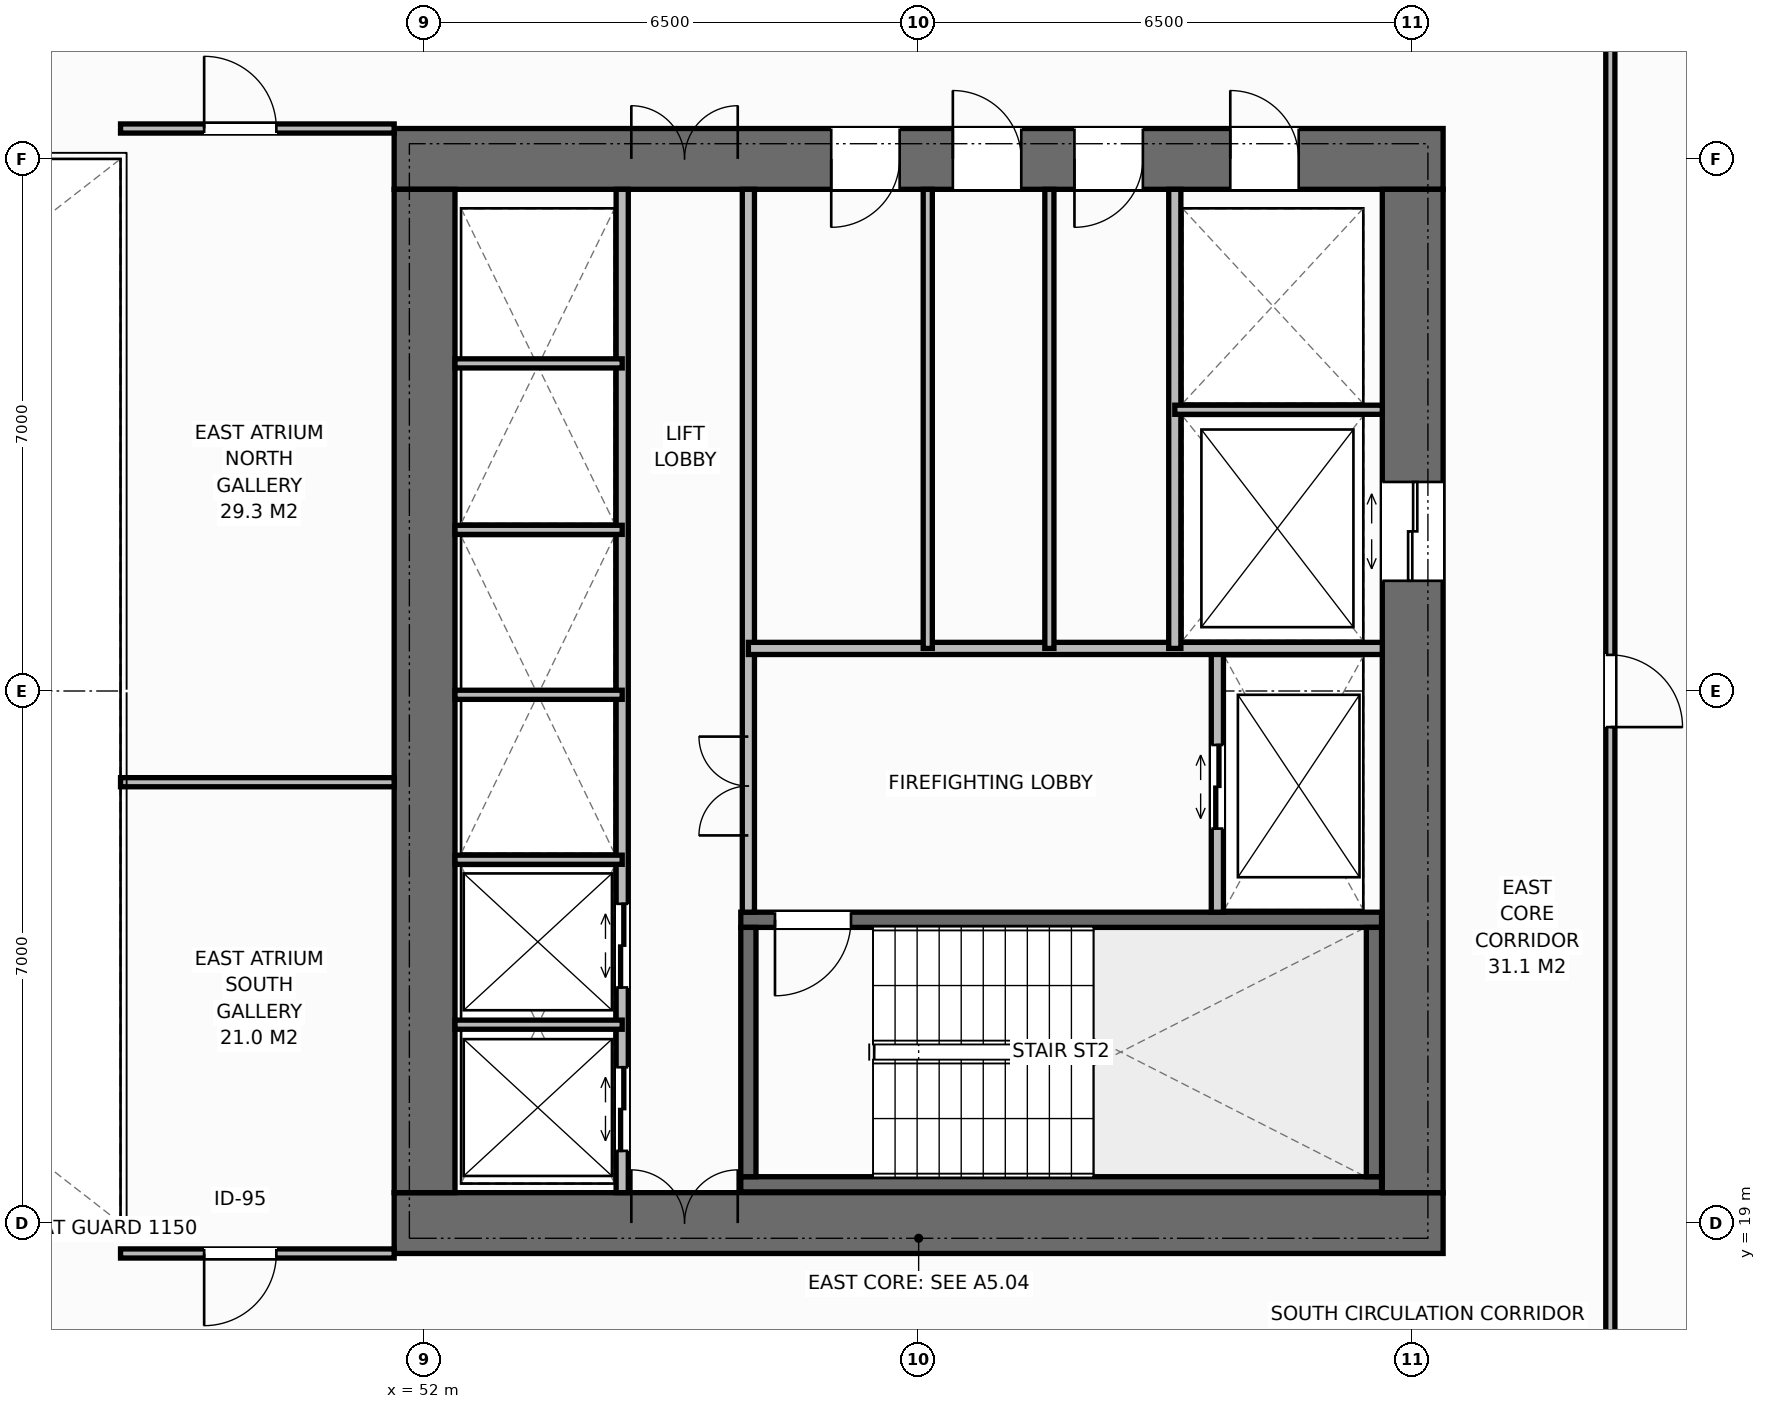
"""IFC4 building model, lengths in metres.
Left out: names, types, materials, properties, quantities, classifications, styles, units other than length and angle.
Written with IfcOpenShell. Run it as: python <this file> out.ifc"""

import sys

from ifc_helpers import new_model, si_unit, direction, frame, frame_2d, origin, place, context, subcontext, project, spatial, rectangle, extrude, element, fill, save


model = new_model("IFC4")
c1 = context("Model", 3, precision=1e-05, world=origin(), true_north=direction((0.0, 1.0)))
c2 = subcontext(c1, "Body", "Model", "MODEL_VIEW")
j1 = project(units=[si_unit("LENGTHUNIT", "METRE"), si_unit("PLANEANGLEUNIT", "RADIAN")], contexts=[c1])
p1 = place(None, origin())
s1 = spatial("IfcSite", under=j1, at=p1, CompositionType="ELEMENT")
p2 = place(p1, origin())
s2 = spatial("IfcBuilding", under=s1, at=p2, CompositionType="ELEMENT")
p3 = place(p2, frame((0.0, 0.0, 39.2)))
s3 = spatial("IfcBuildingStorey", under=s2, at=p3, CompositionType="ELEMENT", Elevation=39.2)
p4 = place(p3, frame((51.6, 19.0, 0.0), z_axis=(0.0, 0.0, 1.0), x_axis=(1.0, 0.0, 0.0)))
e1 = element("IfcWall", 1, at=p4, inside=s3, PredefinedType="SHEAR", context=c2, shape_type="SweptSolid", body=[
    extrude(rectangle(XDim=13.8, YDim=0.8, at=frame_2d((6.9, 0.0))), origin(), (0.0, 0.0, 1.0), 3.8),
])
p5 = place(p4, frame((3.12, 0.0, 0.0)))
e2 = element("IfcOpeningElement", 2, at=p5, cuts=e1, PredefinedType="OPENING", context=c2, shape_type="SweptSolid", body=[
    extrude(rectangle(XDim=1.4, YDim=2.2, at=frame_2d((0.7, 1.1))), frame((0.0, 0.41, 0.0), z_axis=(0.0, -1.0, 0.0), x_axis=(1.0, 0.0, 0.0)), (0.0, 0.0, 1.0), 0.82),
])
p6 = place(p3, frame((51.6, 33.0, 0.0), z_axis=(0.0, 0.0, 1.0), x_axis=(1.0, 0.0, 0.0)))
e3 = element("IfcWall", 3, at=p6, inside=s3, PredefinedType="SHEAR", context=c2, shape_type="SweptSolid", body=[
    extrude(rectangle(XDim=13.8, YDim=0.8, at=frame_2d((6.9, 0.0))), origin(), (0.0, 0.0, 1.0), 3.8),
])
p7 = place(p6, frame((3.12, 0.0, 0.0)))
e4 = element("IfcOpeningElement", 4, at=p7, cuts=e3, PredefinedType="OPENING", context=c2, shape_type="SweptSolid", body=[
    extrude(rectangle(XDim=1.4, YDim=2.2, at=frame_2d((0.7, 1.1))), frame((0.0, 0.41, 0.0), z_axis=(0.0, -1.0, 0.0), x_axis=(1.0, 0.0, 0.0)), (0.0, 0.0, 1.0), 0.82),
])
p8 = place(p6, frame((11.0, 0.0, 0.0)))
e5 = element("IfcOpeningElement", 5, at=p8, cuts=e3, PredefinedType="OPENING", context=c2, shape_type="SweptSolid", body=[
    extrude(rectangle(XDim=0.9, YDim=2.15, at=frame_2d((0.45, 1.075))), frame((0.0, 0.41, 0.0), z_axis=(0.0, -1.0, 0.0), x_axis=(1.0, 0.0, 0.0)), (0.0, 0.0, 1.0), 0.82),
])
p9 = place(p6, frame((5.75, 0.0, 0.0)))
e6 = element("IfcOpeningElement", 6, at=p9, cuts=e3, PredefinedType="OPENING", context=c2, shape_type="SweptSolid", body=[
    extrude(rectangle(XDim=0.9, YDim=2.15, at=frame_2d((0.45, 1.075))), frame((0.0, 0.41, 0.0), z_axis=(0.0, -1.0, 0.0), x_axis=(1.0, 0.0, 0.0)), (0.0, 0.0, 1.0), 0.82),
])
p10 = place(p6, frame((7.35, 0.0, 0.0)))
e7 = element("IfcOpeningElement", 7, at=p10, cuts=e3, PredefinedType="OPENING", context=c2, shape_type="SweptSolid", body=[
    extrude(rectangle(XDim=0.9, YDim=2.15, at=frame_2d((0.45, 1.075))), frame((0.0, 0.41, 0.0), z_axis=(0.0, -1.0, 0.0), x_axis=(1.0, 0.0, 0.0)), (0.0, 0.0, 1.0), 0.82),
])
p11 = place(p6, frame((8.95, 0.0, 0.0)))
e8 = element("IfcOpeningElement", 8, at=p11, cuts=e3, PredefinedType="OPENING", context=c2, shape_type="SweptSolid", body=[
    extrude(rectangle(XDim=0.9, YDim=2.15, at=frame_2d((0.45, 1.075))), frame((0.0, 0.41, 0.0), z_axis=(0.0, -1.0, 0.0), x_axis=(1.0, 0.0, 0.0)), (0.0, 0.0, 1.0), 0.82),
])
p12 = place(p3, frame((52.0, 19.4, 0.0), z_axis=(0.0, 0.0, 1.0), x_axis=(0.0, 1.0, 0.0)))
e9 = element("IfcWall", 9, at=p12, inside=s3, PredefinedType="SHEAR", context=c2, shape_type="SweptSolid", body=[
    extrude(rectangle(XDim=13.2, YDim=0.8, at=frame_2d((6.6, 0.0))), origin(), (0.0, 0.0, 1.0), 3.8),
])
p13 = place(p3, frame((65.0, 19.4, 0.0), z_axis=(0.0, 0.0, 1.0), x_axis=(0.0, 1.0, 0.0)))
e10 = element("IfcWall", 10, at=p13, inside=s3, PredefinedType="SHEAR", context=c2, shape_type="SweptSolid", body=[
    extrude(rectangle(XDim=13.2, YDim=0.8, at=frame_2d((6.6, 0.0))), origin(), (0.0, 0.0, 1.0), 3.8),
])
p14 = place(p13, frame((8.05, 0.0, 0.0)))
e11 = element("IfcOpeningElement", 11, at=p14, cuts=e10, PredefinedType="OPENING", context=c2, shape_type="SweptSolid", body=[
    extrude(rectangle(XDim=1.3, YDim=2.2, at=frame_2d((0.65, 1.1))), frame((0.0, 0.41, 0.0), z_axis=(0.0, -1.0, 0.0), x_axis=(1.0, 0.0, 0.0)), (0.0, 0.0, 1.0), 0.82),
])
p15 = place(p3, frame((56.16, 19.51, 0.0), z_axis=(0.0, 0.0, 1.0), x_axis=(1.0, 0.0, 0.0)))
e12 = element("IfcWall", 12, at=p15, inside=s3, PredefinedType="SHEAR", context=c2, shape_type="SweptSolid", body=[
    extrude(rectangle(XDim=8.43, YDim=0.2, at=frame_2d((4.215, 0.0))), origin(), (0.0, 0.0, 1.0), 3.8),
])
p16 = place(p3, frame((56.16, 22.99, 0.0), z_axis=(0.0, 0.0, 1.0), x_axis=(1.0, 0.0, 0.0)))
e13 = element("IfcWall", 13, at=p16, inside=s3, PredefinedType="SHEAR", context=c2, shape_type="SweptSolid", body=[
    extrude(rectangle(XDim=8.43, YDim=0.2, at=frame_2d((4.215, 0.0))), origin(), (0.0, 0.0, 1.0), 3.8),
])
p17 = place(p16, frame((0.45, 0.0, 0.0)))
e14 = element("IfcOpeningElement", 14, at=p17, cuts=e13, PredefinedType="OPENING", context=c2, shape_type="SweptSolid", body=[
    extrude(rectangle(XDim=1.0, YDim=2.15, at=frame_2d((0.5, 1.075))), frame((0.0, 0.11, 0.0), z_axis=(0.0, -1.0, 0.0), x_axis=(1.0, 0.0, 0.0)), (0.0, 0.0, 1.0), 0.22),
])
for number, where, z_axis, x_axis in (
    (15, (56.26, 19.61, 0.0), (0.0, 0.0, 1.0), (0.0, 1.0, 0.0)),
    (16, (64.49, 19.61, 0.0), (0.0, 0.0, 1.0), (0.0, 1.0, 0.0)),
):
    element("IfcWall", number, at=place(p3, frame(where, z_axis=z_axis, x_axis=x_axis)), inside=s3, PredefinedType="SHEAR", context=c2, shape_type="SweptSolid", body=[
        extrude(rectangle(XDim=3.28, YDim=0.2, at=frame_2d((1.64, 0.0))), origin(), (0.0, 0.0, 1.0), 3.8),
    ])
p18 = place(p3, frame((54.6, 19.4, 0.0), z_axis=(0.0, 0.0, 1.0), x_axis=(0.0, 1.0, 0.0)))
e17 = element("IfcWall", 17, at=p18, inside=s3, PredefinedType="STANDARD", context=c2, shape_type="SweptSolid", body=[
    extrude(rectangle(XDim=13.2, YDim=0.16, at=frame_2d((6.6, 0.0))), origin(), (0.0, 0.0, 1.0), 3.55),
])
p19 = place(p18, frame((0.55, 0.0, 0.0)))
e18 = element("IfcOpeningElement", 18, at=p19, cuts=e17, PredefinedType="OPENING", context=c2, shape_type="SweptSolid", body=[
    extrude(rectangle(XDim=1.1, YDim=2.2, at=frame_2d((0.55, 1.1))), frame((0.0, 0.09, 0.0), z_axis=(0.0, -1.0, 0.0), x_axis=(1.0, 0.0, 0.0)), (0.0, 0.0, 1.0), 0.18),
])
p20 = place(p18, frame((2.7, 0.0, 0.0)))
e19 = element("IfcOpeningElement", 19, at=p20, cuts=e17, PredefinedType="OPENING", context=c2, shape_type="SweptSolid", body=[
    extrude(rectangle(XDim=1.1, YDim=2.2, at=frame_2d((0.55, 1.1))), frame((0.0, 0.09, 0.0), z_axis=(0.0, -1.0, 0.0), x_axis=(1.0, 0.0, 0.0)), (0.0, 0.0, 1.0), 0.18),
])
p21 = place(p3, frame((56.26, 23.09, 0.0), z_axis=(0.0, 0.0, 1.0), x_axis=(0.0, 1.0, 0.0)))
e20 = element("IfcWall", 20, at=p21, inside=s3, PredefinedType="STANDARD", context=c2, shape_type="SweptSolid", body=[
    extrude(rectangle(XDim=9.51, YDim=0.16, at=frame_2d((4.755, 0.0))), origin(), (0.0, 0.0, 1.0), 3.55),
])
p22 = place(p21, frame((1.01, 0.0, 0.0)))
e21 = element("IfcOpeningElement", 21, at=p22, cuts=e20, PredefinedType="OPENING", context=c2, shape_type="SweptSolid", body=[
    extrude(rectangle(XDim=1.3, YDim=2.2, at=frame_2d((0.65, 1.1))), frame((0.0, 0.09, 0.0), z_axis=(0.0, -1.0, 0.0), x_axis=(1.0, 0.0, 0.0)), (0.0, 0.0, 1.0), 0.18),
])
for number, where, z_axis, x_axis in (
    (22, (52.4, 21.61, 0.0), (0.0, 0.0, 1.0), (1.0, 0.0, 0.0)),
    (23, (52.4, 23.78, 0.0), (0.0, 0.0, 1.0), (1.0, 0.0, 0.0)),
    (24, (52.4, 25.95, 0.0), (0.0, 0.0, 1.0), (1.0, 0.0, 0.0)),
    (25, (52.4, 28.12, 0.0), (0.0, 0.0, 1.0), (1.0, 0.0, 0.0)),
    (26, (52.4, 30.31, 0.0), (0.0, 0.0, 1.0), (1.0, 0.0, 0.0)),
):
    element("IfcWall", number, at=place(p3, frame(where, z_axis=z_axis, x_axis=x_axis)), inside=s3, PredefinedType="PARTITIONING", context=c2, shape_type="SweptSolid", body=[
        extrude(rectangle(XDim=2.2, YDim=0.12, at=frame_2d((1.1, 0.0))), origin(), (0.0, 0.0, 1.0), 3.55),
    ])
p23 = place(p3, frame((62.43, 23.09, 0.0), z_axis=(0.0, 0.0, 1.0), x_axis=(0.0, 1.0, 0.0)))
e27 = element("IfcWall", 27, at=p23, inside=s3, PredefinedType="STANDARD", context=c2, shape_type="SweptSolid", body=[
    extrude(rectangle(XDim=3.47, YDim=0.16, at=frame_2d((1.735, 0.0))), origin(), (0.0, 0.0, 1.0), 3.55),
])
p24 = place(p23, frame((1.1, 0.0, 0.0)))
e28 = element("IfcOpeningElement", 28, at=p24, cuts=e27, PredefinedType="OPENING", context=c2, shape_type="SweptSolid", body=[
    extrude(rectangle(XDim=1.1, YDim=2.2, at=frame_2d((0.55, 1.1))), frame((0.0, 0.09, 0.0), z_axis=(0.0, -1.0, 0.0), x_axis=(1.0, 0.0, 0.0)), (0.0, 0.0, 1.0), 0.18),
])
p25 = place(p3, frame((56.26, 26.56, 0.0), z_axis=(0.0, 0.0, 1.0), x_axis=(1.0, 0.0, 0.0)))
e29 = element("IfcWall", 29, at=p25, inside=s3, PredefinedType="STANDARD", context=c2, shape_type="SweptSolid", body=[
    extrude(rectangle(XDim=8.34, YDim=0.16, at=frame_2d((4.17, 0.0))), origin(), (0.0, 0.0, 1.0), 3.55),
])
p26 = place(p3, frame((61.87, 26.56, 0.0), z_axis=(0.0, 0.0, 1.0), x_axis=(0.0, 1.0, 0.0)))
e30 = element("IfcWall", 30, at=p26, inside=s3, PredefinedType="STANDARD", context=c2, shape_type="SweptSolid", body=[
    extrude(rectangle(XDim=6.04, YDim=0.16, at=frame_2d((3.02, 0.0))), origin(), (0.0, 0.0, 1.0), 3.55),
])
p27 = place(p3, frame((61.87, 29.7, 0.0), z_axis=(0.0, 0.0, 1.0), x_axis=(1.0, 0.0, 0.0)))
e31 = element("IfcWall", 31, at=p27, inside=s3, PredefinedType="PARTITIONING", context=c2, shape_type="SweptSolid", body=[
    extrude(rectangle(XDim=2.73, YDim=0.12, at=frame_2d((1.365, 0.0))), origin(), (0.0, 0.0, 1.0), 3.55),
])
for number, where, z_axis, x_axis in (
    (32, (58.62, 26.56, 0.0), (0.0, 0.0, 1.0), (0.0, 1.0, 0.0)),
    (33, (60.22, 26.56, 0.0), (0.0, 0.0, 1.0), (0.0, 1.0, 0.0)),
):
    element("IfcWall", number, at=place(p3, frame(where, z_axis=z_axis, x_axis=x_axis)), inside=s3, PredefinedType="PARTITIONING", context=c2, shape_type="SweptSolid", body=[
        extrude(rectangle(XDim=6.04, YDim=0.12, at=frame_2d((3.02, 0.0))), origin(), (0.0, 0.0, 1.0), 3.55),
    ])
p28 = place(p3, frame((48.0, 24.8, 0.0), z_axis=(0.0, 0.0, 1.0), x_axis=(1.0, 0.0, 0.0)))
e34 = element("IfcWall", 34, at=p28, inside=s3, PredefinedType="PARTITIONING", context=c2, shape_type="SweptSolid", body=[
    extrude(rectangle(XDim=3.6, YDim=0.12, at=frame_2d((1.8, 0.0))), origin(), (0.0, 0.0, 1.0), 3.55),
])
p29 = place(p3, frame((48.0, 18.6, 0.0), z_axis=(0.0, 0.0, 1.0), x_axis=(1.0, 0.0, 0.0)))
e35 = element("IfcWall", 35, at=p29, inside=s3, PredefinedType="PARTITIONING", context=c2, shape_type="SweptSolid", body=[
    extrude(rectangle(XDim=3.6, YDim=0.12, at=frame_2d((1.8, 0.0))), origin(), (0.0, 0.0, 1.0), 3.55),
])
p30 = place(p29, frame((1.1, 0.0, 0.0)))
e36 = element("IfcOpeningElement", 36, at=p30, cuts=e35, PredefinedType="OPENING", context=c2, shape_type="SweptSolid", body=[
    extrude(rectangle(XDim=0.95, YDim=2.15, at=frame_2d((0.475, 1.075))), frame((0.0, 0.07, 0.0), z_axis=(0.0, -1.0, 0.0), x_axis=(1.0, 0.0, 0.0)), (0.0, 0.0, 1.0), 0.14),
])
p31 = place(p3, frame((48.0, 33.4, 0.0), z_axis=(0.0, 0.0, 1.0), x_axis=(1.0, 0.0, 0.0)))
e37 = element("IfcWall", 37, at=p31, inside=s3, PredefinedType="PARTITIONING", context=c2, shape_type="SweptSolid", body=[
    extrude(rectangle(XDim=3.6, YDim=0.12, at=frame_2d((1.8, 0.0))), origin(), (0.0, 0.0, 1.0), 3.55),
])
p32 = place(p31, frame((1.1, 0.0, 0.0)))
e38 = element("IfcOpeningElement", 38, at=p32, cuts=e37, PredefinedType="OPENING", context=c2, shape_type="SweptSolid", body=[
    extrude(rectangle(XDim=0.95, YDim=2.15, at=frame_2d((0.475, 1.075))), frame((0.0, 0.07, 0.0), z_axis=(0.0, -1.0, 0.0), x_axis=(1.0, 0.0, 0.0)), (0.0, 0.0, 1.0), 0.14),
])
p33 = place(p3, frame((67.6, 16.5, 0.0), z_axis=(0.0, 0.0, 1.0), x_axis=(0.0, 1.0, 0.0)))
e39 = element("IfcWall", 39, at=p33, inside=s3, PredefinedType="PARTITIONING", context=c2, shape_type="SweptSolid", body=[
    extrude(rectangle(XDim=19.0, YDim=0.12, at=frame_2d((9.5, 0.0))), origin(), (0.0, 0.0, 1.0), 3.55),
])
p34 = place(p33, frame((9.025, 0.0, 0.0)))
e40 = element("IfcOpeningElement", 40, at=p34, cuts=e39, PredefinedType="OPENING", context=c2, shape_type="SweptSolid", body=[
    extrude(rectangle(XDim=0.95, YDim=2.15, at=frame_2d((0.475, 1.075))), frame((0.0, 0.07, 0.0), z_axis=(0.0, -1.0, 0.0), x_axis=(1.0, 0.0, 0.0)), (0.0, 0.0, 1.0), 0.14),
])
p35 = place(p5, origin())
e41 = element("IfcDoor", 41, at=p35, inside=s3, OperationType="DOUBLE_DOOR_SINGLE_SWING", PredefinedType="DOOR", context=c2, shape_type="SweptSolid", body=[
    extrude(rectangle(XDim=1.4, YDim=2.2, at=frame_2d((0.7, 1.1))), frame((0.0, 0.125, 0.0), z_axis=(0.0, -1.0, 0.0), x_axis=(1.0, 0.0, 0.0)), (0.0, 0.0, 1.0), 0.05),
])
fill(e2, e41)
p36 = place(p7, origin())
e42 = element("IfcDoor", 42, at=p36, inside=s3, OperationType="DOUBLE_DOOR_SINGLE_SWING", PredefinedType="DOOR", context=c2, shape_type="SweptSolid", body=[
    extrude(rectangle(XDim=1.4, YDim=2.2, at=frame_2d((0.7, 1.1))), frame((0.0, -0.075, 0.0), z_axis=(0.0, -1.0, 0.0), x_axis=(1.0, 0.0, 0.0)), (0.0, 0.0, 1.0), 0.05),
])
fill(e4, e42)
p37 = place(p19, origin())
e43 = element("IfcDoor", 43, at=p37, inside=s3, OperationType="DOUBLE_DOOR_SLIDING", PredefinedType="DOOR", context=c2, shape_type="SweptSolid", body=[
    extrude(rectangle(XDim=1.1, YDim=2.2, at=frame_2d((0.55, 1.1))), frame((0.0, 0.025, 0.0), z_axis=(0.0, -1.0, 0.0), x_axis=(1.0, 0.0, 0.0)), (0.0, 0.0, 1.0), 0.05),
])
fill(e18, e43)
p38 = place(p20, origin())
e44 = element("IfcDoor", 44, at=p38, inside=s3, OperationType="DOUBLE_DOOR_SLIDING", PredefinedType="DOOR", context=c2, shape_type="SweptSolid", body=[
    extrude(rectangle(XDim=1.1, YDim=2.2, at=frame_2d((0.55, 1.1))), frame((0.0, 0.025, 0.0), z_axis=(0.0, -1.0, 0.0), x_axis=(1.0, 0.0, 0.0)), (0.0, 0.0, 1.0), 0.05),
])
fill(e19, e44)
p39 = place(p17, origin())
e45 = element("IfcDoor", 45, at=p39, inside=s3, OperationType="SINGLE_SWING_RIGHT", PredefinedType="DOOR", context=c2, shape_type="SweptSolid", body=[
    extrude(rectangle(XDim=1.0, YDim=2.15, at=frame_2d((0.5, 1.075))), frame((0.0, 0.025, 0.0), z_axis=(0.0, -1.0, 0.0), x_axis=(1.0, 0.0, 0.0)), (0.0, 0.0, 1.0), 0.05),
])
fill(e14, e45)
p40 = place(p24, origin())
e46 = element("IfcDoor", 46, at=p40, inside=s3, OperationType="DOUBLE_DOOR_SLIDING", PredefinedType="DOOR", context=c2, shape_type="SweptSolid", body=[
    extrude(rectangle(XDim=1.1, YDim=2.2, at=frame_2d((0.55, 1.1))), frame((0.0, 0.025, 0.0), z_axis=(0.0, -1.0, 0.0), x_axis=(1.0, 0.0, 0.0)), (0.0, 0.0, 1.0), 0.05),
])
fill(e28, e46)
p41 = place(p22, origin())
e47 = element("IfcDoor", 47, at=p41, inside=s3, OperationType="DOUBLE_DOOR_SINGLE_SWING", PredefinedType="DOOR", context=c2, shape_type="SweptSolid", body=[
    extrude(rectangle(XDim=1.3, YDim=2.2, at=frame_2d((0.65, 1.1))), frame((0.0, 0.025, 0.0), z_axis=(0.0, -1.0, 0.0), x_axis=(1.0, 0.0, 0.0)), (0.0, 0.0, 1.0), 0.05),
])
fill(e21, e47)
p42 = place(p14, origin())
e48 = element("IfcDoor", 48, at=p42, inside=s3, OperationType="DOUBLE_DOOR_SLIDING", PredefinedType="DOOR", context=c2, shape_type="SweptSolid", body=[
    extrude(rectangle(XDim=1.3, YDim=2.2, at=frame_2d((0.65, 1.1))), frame((0.0, 0.025, 0.0), z_axis=(0.0, -1.0, 0.0), x_axis=(1.0, 0.0, 0.0)), (0.0, 0.0, 1.0), 0.05),
])
fill(e11, e48)
p43 = place(p8, origin())
e49 = element("IfcDoor", 49, at=p43, inside=s3, OperationType="SINGLE_SWING_LEFT", PredefinedType="DOOR", context=c2, shape_type="SweptSolid", body=[
    extrude(rectangle(XDim=0.9, YDim=2.15, at=frame_2d((0.45, 1.075))), frame((0.0, -0.075, 0.0), z_axis=(0.0, -1.0, 0.0), x_axis=(1.0, 0.0, 0.0)), (0.0, 0.0, 1.0), 0.05),
])
fill(e5, e49)
p44 = place(p9, origin())
e50 = element("IfcDoor", 50, at=p44, inside=s3, OperationType="SINGLE_SWING_RIGHT", PredefinedType="DOOR", context=c2, shape_type="SweptSolid", body=[
    extrude(rectangle(XDim=0.9, YDim=2.15, at=frame_2d((0.45, 1.075))), frame((0.0, -0.075, 0.0), z_axis=(0.0, -1.0, 0.0), x_axis=(1.0, 0.0, 0.0)), (0.0, 0.0, 1.0), 0.05),
])
fill(e6, e50)
p45 = place(p10, origin())
e51 = element("IfcDoor", 51, at=p45, inside=s3, OperationType="SINGLE_SWING_LEFT", PredefinedType="DOOR", context=c2, shape_type="SweptSolid", body=[
    extrude(rectangle(XDim=0.9, YDim=2.15, at=frame_2d((0.45, 1.075))), frame((0.0, -0.075, 0.0), z_axis=(0.0, -1.0, 0.0), x_axis=(1.0, 0.0, 0.0)), (0.0, 0.0, 1.0), 0.05),
])
fill(e7, e51)
p46 = place(p11, origin())
e52 = element("IfcDoor", 52, at=p46, inside=s3, OperationType="SINGLE_SWING_RIGHT", PredefinedType="DOOR", context=c2, shape_type="SweptSolid", body=[
    extrude(rectangle(XDim=0.9, YDim=2.15, at=frame_2d((0.45, 1.075))), frame((0.0, -0.075, 0.0), z_axis=(0.0, -1.0, 0.0), x_axis=(1.0, 0.0, 0.0)), (0.0, 0.0, 1.0), 0.05),
])
fill(e8, e52)
p47 = place(p30, origin())
e53 = element("IfcDoor", 53, at=p47, inside=s3, OperationType="SINGLE_SWING_RIGHT", PredefinedType="DOOR", context=c2, shape_type="SweptSolid", body=[
    extrude(rectangle(XDim=0.95, YDim=2.15, at=frame_2d((0.475, 1.075))), frame((0.0, 0.025, 0.0), z_axis=(0.0, -1.0, 0.0), x_axis=(1.0, 0.0, 0.0)), (0.0, 0.0, 1.0), 0.05),
])
fill(e36, e53)
p48 = place(p32, origin())
e54 = element("IfcDoor", 54, at=p48, inside=s3, OperationType="SINGLE_SWING_LEFT", PredefinedType="DOOR", context=c2, shape_type="SweptSolid", body=[
    extrude(rectangle(XDim=0.95, YDim=2.15, at=frame_2d((0.475, 1.075))), frame((0.0, 0.025, 0.0), z_axis=(0.0, -1.0, 0.0), x_axis=(1.0, 0.0, 0.0)), (0.0, 0.0, 1.0), 0.05),
])
fill(e38, e54)
p49 = place(p34, origin())
e55 = element("IfcDoor", 55, at=p49, inside=s3, OperationType="SINGLE_SWING_RIGHT", PredefinedType="DOOR", context=c2, shape_type="SweptSolid", body=[
    extrude(rectangle(XDim=0.95, YDim=2.15, at=frame_2d((0.475, 1.075))), frame((0.0, 0.025, 0.0), z_axis=(0.0, -1.0, 0.0), x_axis=(1.0, 0.0, 0.0)), (0.0, 0.0, 1.0), 0.05),
])
fill(e40, e55)
save(model, sys.argv[1])
